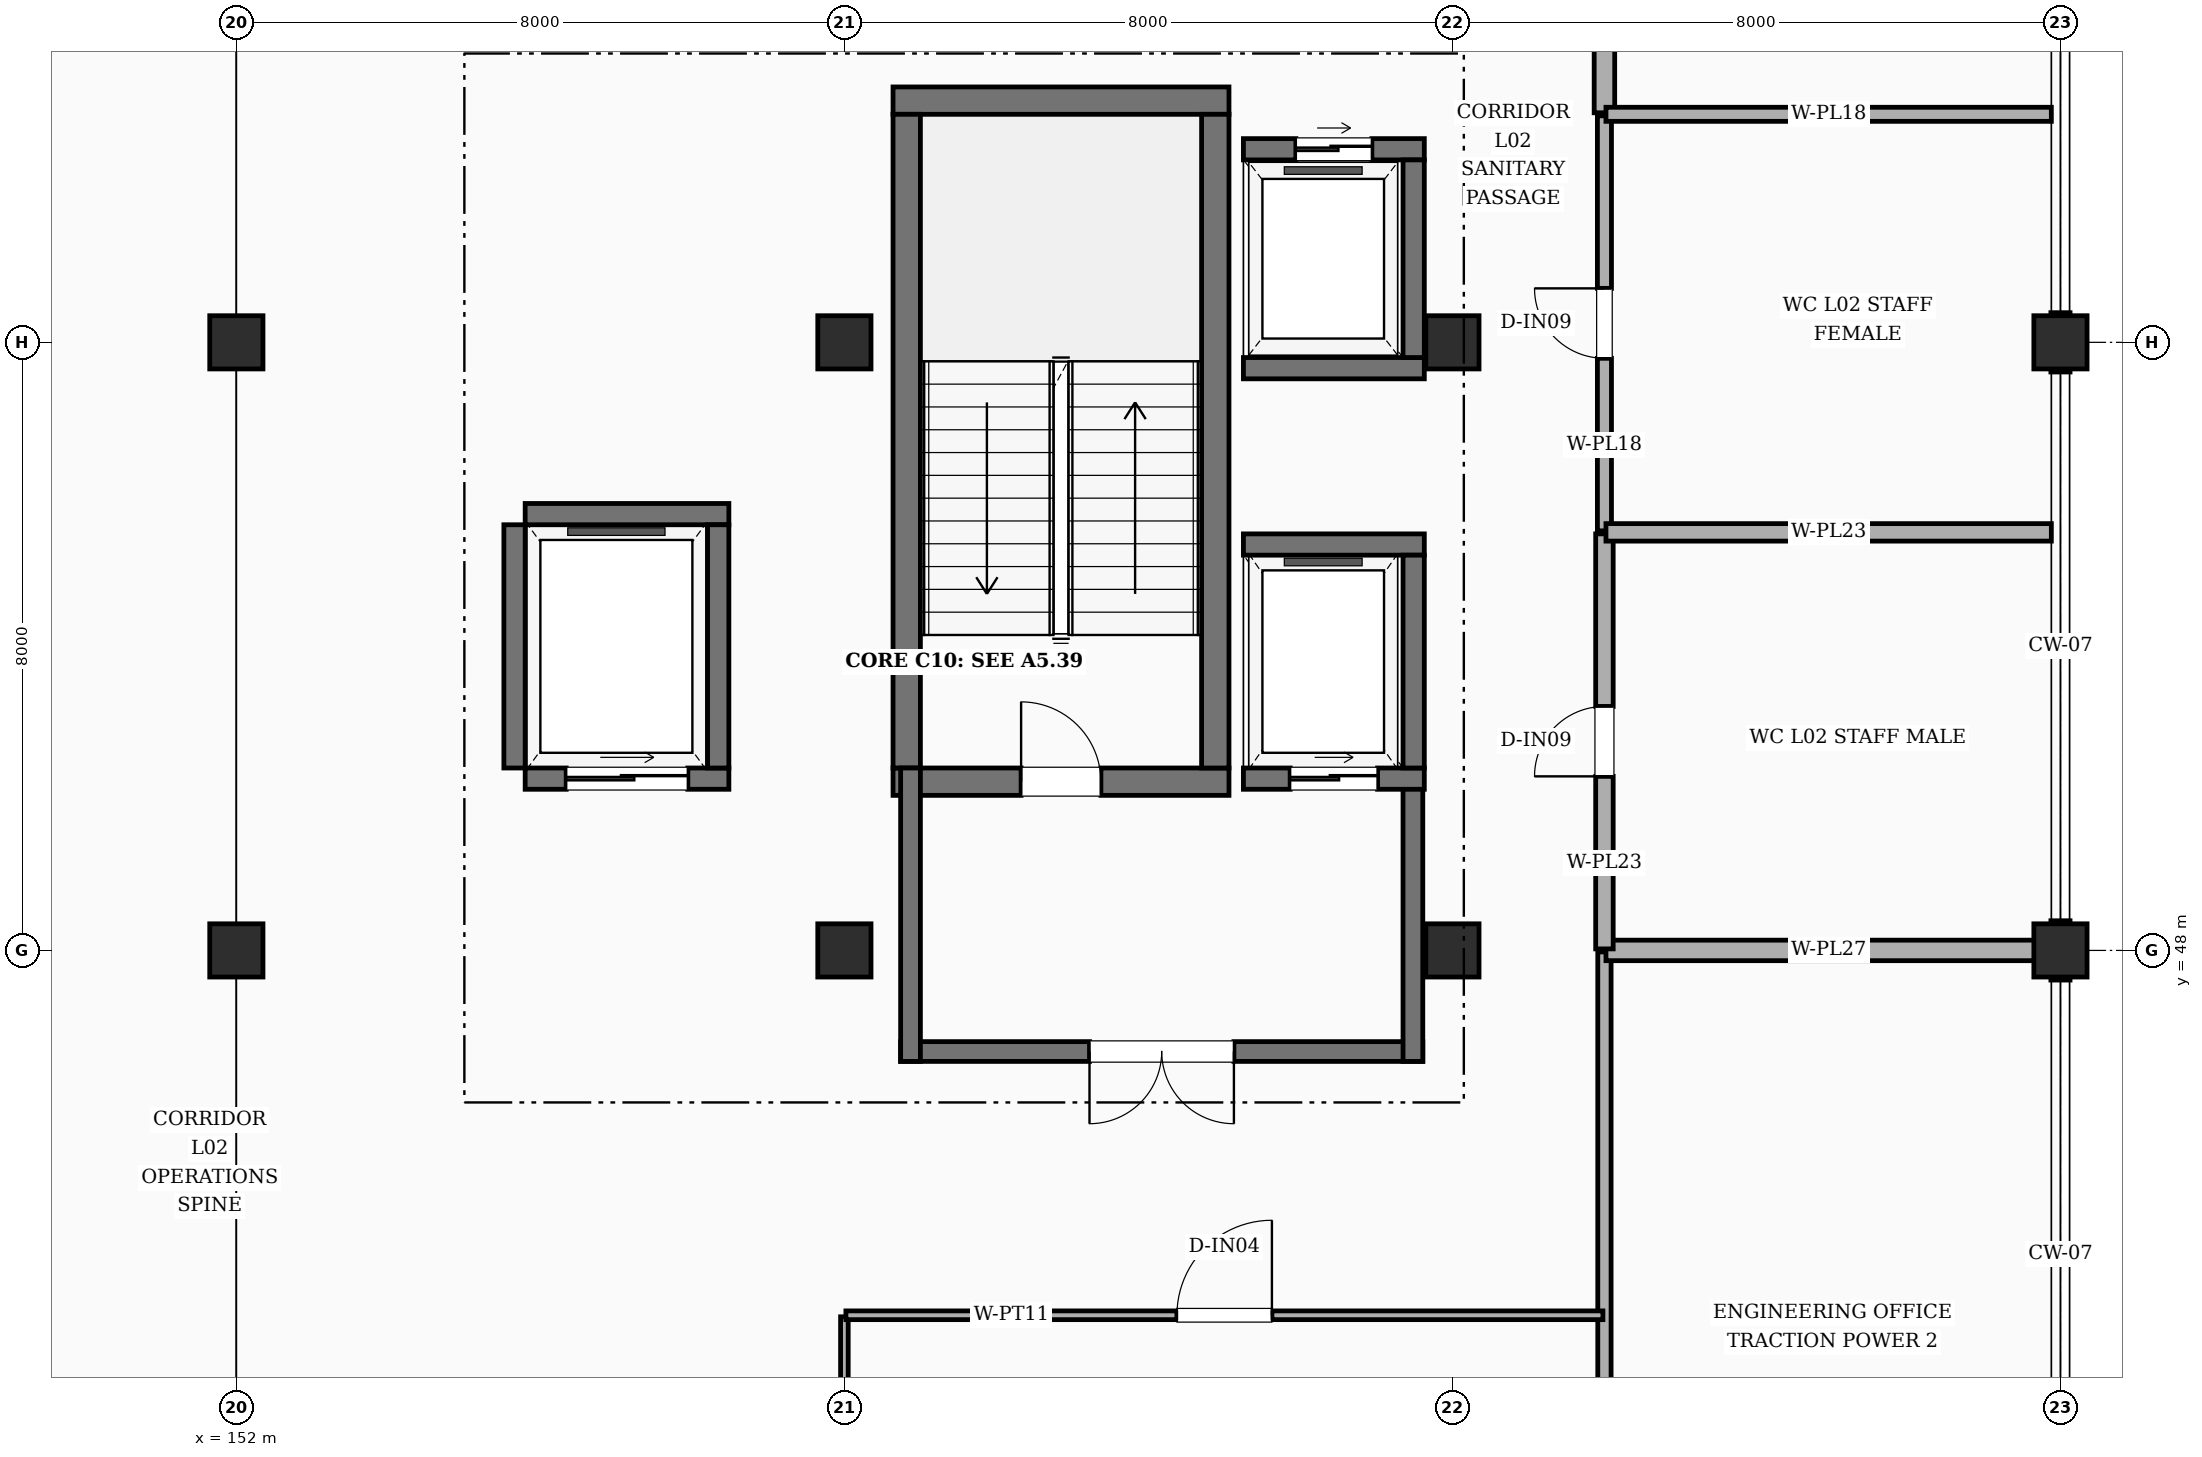
"""IFC4 building model, lengths in metres.
Left out: names, types, materials, properties, quantities, classifications, styles, units other than length and angle.
Written with IfcOpenShell. Run it as: python <this file> out.ifc"""

import sys

from ifc_helpers import new_model, si_unit, direction, frame, frame_2d, origin, origin_2d, place, context, subcontext, project, spatial, rectangle, extrude, element, fill, save


model = new_model("IFC4")
c1 = context("Model", 3, precision=1e-05, world=origin(), true_north=direction((0.0, 1.0)))
c2 = subcontext(c1, "Body", "Model", "MODEL_VIEW")
j1 = project(units=[si_unit("LENGTHUNIT", "METRE"), si_unit("PLANEANGLEUNIT", "RADIAN")], contexts=[c1])
p1 = place(None, origin())
s1 = spatial("IfcSite", under=j1, at=p1, CompositionType="ELEMENT")
p2 = place(p1, origin())
s2 = spatial("IfcBuilding", under=s1, at=p2, CompositionType="ELEMENT")
p3 = place(p2, frame((0.0, 0.0, 10.8)))
s3 = spatial("IfcBuildingStorey", under=s2, at=p3, CompositionType="ELEMENT", Elevation=10.8)
for number, where, z_axis, x_axis in (
    (1, (152.0, 48.0, 0.0), (0.0, 0.0, 1.0), (1.0, 0.0, 0.0)),
    (2, (152.0, 56.0, 0.0), (0.0, 0.0, 1.0), (1.0, 0.0, 0.0)),
    (3, (160.0, 48.0, 0.0), (0.0, 0.0, 1.0), (1.0, 0.0, 0.0)),
    (4, (160.0, 56.0, 0.0), (0.0, 0.0, 1.0), (1.0, 0.0, 0.0)),
    (5, (168.0, 48.0, 0.0), (0.0, 0.0, 1.0), (1.0, 0.0, 0.0)),
    (6, (168.0, 56.0, 0.0), (0.0, 0.0, 1.0), (1.0, 0.0, 0.0)),
    (7, (176.0, 48.0, 0.0), (0.0, 0.0, 1.0), (1.0, 0.0, 0.0)),
    (8, (176.0, 56.0, 0.0), (0.0, 0.0, 1.0), (1.0, 0.0, 0.0)),
):
    element("IfcColumn", number, at=place(p3, frame(where, z_axis=z_axis, x_axis=x_axis)), inside=s3, PredefinedType="COLUMN", context=c2, shape_type="SweptSolid", body=[
        extrude(rectangle(XDim=0.7, YDim=0.7, at=origin_2d()), origin(), (0.0, 0.0, 1.0), 4.2),
    ])
p4 = place(p3, frame((160.64, 50.22, 0.0), z_axis=(0.0, 0.0, 1.0), x_axis=(1.0, 0.0, 0.0)))
e9 = element("IfcWall", 9, at=p4, inside=s3, PredefinedType="SHEAR", context=c2, shape_type="SweptSolid", body=[
    extrude(rectangle(XDim=4.42, YDim=0.36, at=frame_2d((2.21, 0.0))), origin(), (0.0, 0.0, 1.0), 4.2),
])
p5 = place(p4, frame((1.685, 0.0, 0.0)))
e10 = element("IfcOpeningElement", 10, at=p5, cuts=e9, PredefinedType="OPENING", context=c2, shape_type="SweptSolid", body=[
    extrude(rectangle(XDim=1.05, YDim=2.15, at=frame_2d((0.525, 1.075))), frame((0.0, 0.19, 0.0), z_axis=(0.0, -1.0, 0.0), x_axis=(1.0, 0.0, 0.0)), (0.0, 0.0, 1.0), 0.38),
])
p6 = place(p3, frame((160.64, 59.18, 0.0), z_axis=(0.0, 0.0, 1.0), x_axis=(1.0, 0.0, 0.0)))
e11 = element("IfcWall", 11, at=p6, inside=s3, PredefinedType="SHEAR", context=c2, shape_type="SweptSolid", body=[
    extrude(rectangle(XDim=4.42, YDim=0.36, at=frame_2d((2.21, 0.0))), origin(), (0.0, 0.0, 1.0), 4.2),
])
for number, where, z_axis, x_axis in (
    (12, (160.82, 50.4, 0.0), (0.0, 0.0, 1.0), (0.0, 1.0, 0.0)),
    (13, (164.88, 50.4, 0.0), (0.0, 0.0, 1.0), (0.0, 1.0, 0.0)),
):
    element("IfcWall", number, at=place(p3, frame(where, z_axis=z_axis, x_axis=x_axis)), inside=s3, PredefinedType="SHEAR", context=c2, shape_type="SweptSolid", body=[
        extrude(rectangle(XDim=8.6, YDim=0.36, at=frame_2d((4.3, 0.0))), origin(), (0.0, 0.0, 1.0), 4.2),
    ])
p7 = place(p3, frame((167.61, 46.67, 0.0), z_axis=(0.0, 0.0, 1.0), x_axis=(-1.0, 0.0, 0.0)))
e14 = element("IfcWall", 14, at=p7, inside=s3, PredefinedType="SHEAR", context=c2, shape_type="SweptSolid", body=[
    extrude(rectangle(XDim=6.87, YDim=0.26, at=frame_2d((3.435, 0.0))), origin(), (0.0, 0.0, 1.0), 4.2),
])
p8 = place(p7, frame((2.485, 0.0, 0.0)))
e15 = element("IfcOpeningElement", 15, at=p8, cuts=e14, PredefinedType="OPENING", context=c2, shape_type="SweptSolid", body=[
    extrude(rectangle(XDim=1.9, YDim=2.25, at=frame_2d((0.95, 1.125))), frame((0.0, 0.14, 0.0), z_axis=(0.0, -1.0, 0.0), x_axis=(1.0, 0.0, 0.0)), (0.0, 0.0, 1.0), 0.28),
])
for number, where, z_axis, x_axis in (
    (16, (160.87, 46.54, 0.0), (0.0, 0.0, 1.0), (0.0, 1.0, 0.0)),
    (17, (167.48, 46.54, 0.0), (0.0, 0.0, 1.0), (0.0, 1.0, 0.0)),
):
    element("IfcWall", number, at=place(p3, frame(where, z_axis=z_axis, x_axis=x_axis)), inside=s3, PredefinedType="SHEAR", context=c2, shape_type="SweptSolid", body=[
        extrude(rectangle(XDim=3.86, YDim=0.26, at=frame_2d((1.93, 0.0))), origin(), (0.0, 0.0, 1.0), 4.2),
    ])
p9 = place(p3, frame((165.25, 50.26, 0.0), z_axis=(0.0, 0.0, 1.0), x_axis=(1.0, 0.0, 0.0)))
e18 = element("IfcWall", 18, at=p9, inside=s3, PredefinedType="SHEAR", context=c2, shape_type="SweptSolid", body=[
    extrude(rectangle(XDim=2.38, YDim=0.28, at=frame_2d((1.19, 0.0))), origin(), (0.0, 0.0, 1.0), 4.2),
])
p10 = place(p9, frame((0.615, 0.0, 0.0)))
e19 = element("IfcOpeningElement", 19, at=p10, cuts=e18, PredefinedType="OPENING", context=c2, shape_type="SweptSolid", body=[
    extrude(rectangle(XDim=1.15, YDim=2.2, at=frame_2d((0.575, 1.1))), frame((0.0, 0.15, 0.0), z_axis=(0.0, -1.0, 0.0), x_axis=(1.0, 0.0, 0.0)), (0.0, 0.0, 1.0), 0.3),
])
p11 = place(p3, frame((165.25, 53.34, 0.0), z_axis=(0.0, 0.0, 1.0), x_axis=(1.0, 0.0, 0.0)))
e20 = element("IfcWall", 20, at=p11, inside=s3, PredefinedType="SHEAR", context=c2, shape_type="SweptSolid", body=[
    extrude(rectangle(XDim=2.38, YDim=0.28, at=frame_2d((1.19, 0.0))), origin(), (0.0, 0.0, 1.0), 4.2),
])
p12 = place(p3, frame((167.49, 50.4, 0.0), z_axis=(0.0, 0.0, 1.0), x_axis=(0.0, 1.0, 0.0)))
e21 = element("IfcWall", 21, at=p12, inside=s3, PredefinedType="SHEAR", context=c2, shape_type="SweptSolid", body=[
    extrude(rectangle(XDim=2.8, YDim=0.28, at=frame_2d((1.4, 0.0))), origin(), (0.0, 0.0, 1.0), 4.2),
])
p13 = place(p3, frame((165.25, 55.66, 0.0), z_axis=(0.0, 0.0, 1.0), x_axis=(1.0, 0.0, 0.0)))
e22 = element("IfcWall", 22, at=p13, inside=s3, PredefinedType="SHEAR", context=c2, shape_type="SweptSolid", body=[
    extrude(rectangle(XDim=2.38, YDim=0.28, at=frame_2d((1.19, 0.0))), origin(), (0.0, 0.0, 1.0), 4.2),
])
p14 = place(p3, frame((165.25, 58.54, 0.0), z_axis=(0.0, 0.0, 1.0), x_axis=(1.0, 0.0, 0.0)))
e23 = element("IfcWall", 23, at=p14, inside=s3, PredefinedType="SHEAR", context=c2, shape_type="SweptSolid", body=[
    extrude(rectangle(XDim=2.38, YDim=0.28, at=frame_2d((1.19, 0.0))), origin(), (0.0, 0.0, 1.0), 4.2),
])
p15 = place(p14, frame((0.69, 0.0, 0.0)))
e24 = element("IfcOpeningElement", 24, at=p15, cuts=e23, PredefinedType="OPENING", context=c2, shape_type="SweptSolid", body=[
    extrude(rectangle(XDim=1.0, YDim=2.15, at=frame_2d((0.5, 1.075))), frame((0.0, 0.15, 0.0), z_axis=(0.0, -1.0, 0.0), x_axis=(1.0, 0.0, 0.0)), (0.0, 0.0, 1.0), 0.3),
])
p16 = place(p3, frame((167.49, 55.8, 0.0), z_axis=(0.0, 0.0, 1.0), x_axis=(0.0, 1.0, 0.0)))
e25 = element("IfcWall", 25, at=p16, inside=s3, PredefinedType="SHEAR", context=c2, shape_type="SweptSolid", body=[
    extrude(rectangle(XDim=2.6, YDim=0.28, at=frame_2d((1.3, 0.0))), origin(), (0.0, 0.0, 1.0), 4.2),
])
p17 = place(p3, frame((155.8, 50.26, 0.0), z_axis=(0.0, 0.0, 1.0), x_axis=(1.0, 0.0, 0.0)))
e26 = element("IfcWall", 26, at=p17, inside=s3, PredefinedType="SHEAR", context=c2, shape_type="SweptSolid", body=[
    extrude(rectangle(XDim=2.68, YDim=0.28, at=frame_2d((1.34, 0.0))), origin(), (0.0, 0.0, 1.0), 4.2),
])
p18 = place(p17, frame((0.54, 0.0, 0.0)))
e27 = element("IfcOpeningElement", 27, at=p18, cuts=e26, PredefinedType="OPENING", context=c2, shape_type="SweptSolid", body=[
    extrude(rectangle(XDim=1.6, YDim=2.35, at=frame_2d((0.8, 1.175))), frame((0.0, 0.15, 0.0), z_axis=(0.0, -1.0, 0.0), x_axis=(1.0, 0.0, 0.0)), (0.0, 0.0, 1.0), 0.3),
])
p19 = place(p3, frame((155.8, 53.74, 0.0), z_axis=(0.0, 0.0, 1.0), x_axis=(1.0, 0.0, 0.0)))
e28 = element("IfcWall", 28, at=p19, inside=s3, PredefinedType="SHEAR", context=c2, shape_type="SweptSolid", body=[
    extrude(rectangle(XDim=2.68, YDim=0.28, at=frame_2d((1.34, 0.0))), origin(), (0.0, 0.0, 1.0), 4.2),
])
for number, where, z_axis, x_axis in (
    (29, (158.34, 50.4, 0.0), (0.0, 0.0, 1.0), (0.0, 1.0, 0.0)),
    (30, (155.66, 50.4, 0.0), (0.0, 0.0, 1.0), (0.0, 1.0, 0.0)),
):
    element("IfcWall", number, at=place(p3, frame(where, z_axis=z_axis, x_axis=x_axis)), inside=s3, PredefinedType="SHEAR", context=c2, shape_type="SweptSolid", body=[
        extrude(rectangle(XDim=3.2, YDim=0.28, at=frame_2d((1.6, 0.0))), origin(), (0.0, 0.0, 1.0), 4.2),
    ])
p20 = place(p3, frame((160.0, 24.02, 0.0), z_axis=(0.0, 0.0, 1.0), x_axis=(0.0, 1.0, 0.0)))
e31 = element("IfcWall", 31, at=p20, inside=s3, PredefinedType="PARTITIONING", context=c2, shape_type="SweptSolid", body=[
    extrude(rectangle(XDim=19.16, YDim=0.1, at=frame_2d((9.58, 0.0))), origin(), (0.0, 0.0, 1.0), 3.25),
])
p21 = place(p3, frame((170.0, 24.02, 0.0), z_axis=(0.0, 0.0, 1.0), x_axis=(0.0, 1.0, 0.0)))
e32 = element("IfcWall", 32, at=p21, inside=s3, PredefinedType="PARTITIONING", context=c2, shape_type="SweptSolid", body=[
    extrude(rectangle(XDim=23.96, YDim=0.175, at=frame_2d((11.98, 0.0))), origin(), (0.0, 0.0, 1.0), 3.25),
])
p22 = place(p21, frame((11.47, 0.0, 0.0)))
e33 = element("IfcOpeningElement", 33, at=p22, cuts=e32, PredefinedType="OPENING", context=c2, shape_type="SweptSolid", body=[
    extrude(rectangle(XDim=1.02, YDim=2.12, at=frame_2d((0.51, 1.06))), frame((0.0, 0.097, 0.0), z_axis=(0.0, -1.0, 0.0), x_axis=(1.0, 0.0, 0.0)), (0.0, 0.0, 1.0), 0.195),
])
p23 = place(p3, frame((170.02, 48.0, 0.0), z_axis=(0.0, 0.0, 1.0), x_axis=(1.0, 0.0, 0.0)))
e34 = element("IfcWall", 34, at=p23, inside=s3, PredefinedType="PLUMBINGWALL", context=c2, shape_type="SweptSolid", body=[
    extrude(rectangle(XDim=5.86, YDim=0.27, at=frame_2d((2.93, 0.0))), origin(), (0.0, 0.0, 1.0), 3.25),
])
p24 = place(p3, frame((170.0, 48.02, 0.0), z_axis=(0.0, 0.0, 1.0), x_axis=(0.0, 1.0, 0.0)))
e35 = element("IfcWall", 35, at=p24, inside=s3, PredefinedType="PLUMBINGWALL", context=c2, shape_type="SweptSolid", body=[
    extrude(rectangle(XDim=5.46, YDim=0.23, at=frame_2d((2.73, 0.0))), origin(), (0.0, 0.0, 1.0), 3.25),
])
p25 = place(p24, frame((2.27, 0.0, 0.0)))
e36 = element("IfcOpeningElement", 36, at=p25, cuts=e35, PredefinedType="OPENING", context=c2, shape_type="SweptSolid", body=[
    extrude(rectangle(XDim=0.92, YDim=2.1, at=frame_2d((0.46, 1.05))), frame((0.0, 0.125, 0.0), z_axis=(0.0, -1.0, 0.0), x_axis=(1.0, 0.0, 0.0)), (0.0, 0.0, 1.0), 0.25),
])
p26 = place(p3, frame((170.0, 53.52, 0.0), z_axis=(0.0, 0.0, 1.0), x_axis=(0.0, 1.0, 0.0)))
e37 = element("IfcWall", 37, at=p26, inside=s3, PredefinedType="PLUMBINGWALL", context=c2, shape_type="SweptSolid", body=[
    extrude(rectangle(XDim=5.46, YDim=0.185, at=frame_2d((2.73, 0.0))), origin(), (0.0, 0.0, 1.0), 3.25),
])
p27 = place(p26, frame((2.27, 0.0, 0.0)))
e38 = element("IfcOpeningElement", 38, at=p27, cuts=e37, PredefinedType="OPENING", context=c2, shape_type="SweptSolid", body=[
    extrude(rectangle(XDim=0.92, YDim=2.1, at=frame_2d((0.46, 1.05))), frame((0.0, 0.103, 0.0), z_axis=(0.0, -1.0, 0.0), x_axis=(1.0, 0.0, 0.0)), (0.0, 0.0, 1.0), 0.205),
])
p28 = place(p3, frame((170.0, 59.02, 0.0), z_axis=(0.0, 0.0, 1.0), x_axis=(0.0, 1.0, 0.0)))
e39 = element("IfcWall", 39, at=p28, inside=s3, PredefinedType="PLUMBINGWALL", context=c2, shape_type="SweptSolid", body=[
    extrude(rectangle(XDim=4.86, YDim=0.27, at=frame_2d((2.43, 0.0))), origin(), (0.0, 0.0, 1.0), 3.25),
])
p29 = place(p28, frame((1.95, 0.0, 0.0)))
e40 = element("IfcOpeningElement", 40, at=p29, cuts=e39, PredefinedType="OPENING", context=c2, shape_type="SweptSolid", body=[
    extrude(rectangle(XDim=0.96, YDim=2.1, at=frame_2d((0.48, 1.05))), frame((0.0, 0.145, 0.0), z_axis=(0.0, -1.0, 0.0), x_axis=(1.0, 0.0, 0.0)), (0.0, 0.0, 1.0), 0.29),
])
p30 = place(p3, frame((170.02, 53.5, 0.0), z_axis=(0.0, 0.0, 1.0), x_axis=(1.0, 0.0, 0.0)))
e41 = element("IfcWall", 41, at=p30, inside=s3, PredefinedType="PLUMBINGWALL", context=c2, shape_type="SweptSolid", body=[
    extrude(rectangle(XDim=5.86, YDim=0.23, at=frame_2d((2.93, 0.0))), origin(), (0.0, 0.0, 1.0), 3.33),
])
p31 = place(p3, frame((170.02, 59.0, 0.0), z_axis=(0.0, 0.0, 1.0), x_axis=(1.0, 0.0, 0.0)))
e42 = element("IfcWall", 42, at=p31, inside=s3, PredefinedType="PLUMBINGWALL", context=c2, shape_type="SweptSolid", body=[
    extrude(rectangle(XDim=5.86, YDim=0.185, at=frame_2d((2.93, 0.0))), origin(), (0.0, 0.0, 1.0), 3.33),
])
p32 = place(p3, frame((160.02, 43.2, 0.0), z_axis=(0.0, 0.0, 1.0), x_axis=(1.0, 0.0, 0.0)))
e43 = element("IfcWall", 43, at=p32, inside=s3, PredefinedType="PARTITIONING", context=c2, shape_type="SweptSolid", body=[
    extrude(rectangle(XDim=9.96, YDim=0.115, at=frame_2d((4.98, 0.0))), origin(), (0.0, 0.0, 1.0), 3.25),
])
p33 = place(p32, frame((4.355, 0.0, 0.0)))
e44 = element("IfcOpeningElement", 44, at=p33, cuts=e43, PredefinedType="OPENING", context=c2, shape_type="SweptSolid", body=[
    extrude(rectangle(XDim=1.25, YDim=2.15, at=frame_2d((0.625, 1.075))), frame((0.0, 0.067, 0.0), z_axis=(0.0, -1.0, 0.0), x_axis=(1.0, 0.0, 0.0)), (0.0, 0.0, 1.0), 0.135),
])
p34 = place(p5, origin())
e45 = element("IfcDoor", 45, at=p34, inside=s3, OperationType="SINGLE_SWING_LEFT", PredefinedType="DOOR", context=c2, shape_type="SweptSolid", body=[
    extrude(rectangle(XDim=1.05, YDim=2.15, at=frame_2d((0.525, 1.075))), frame((0.0, 0.025, 0.0), z_axis=(0.0, -1.0, 0.0), x_axis=(1.0, 0.0, 0.0)), (0.0, 0.0, 1.0), 0.05),
])
fill(e10, e45)
p35 = place(p8, origin())
e46 = element("IfcDoor", 46, at=p35, inside=s3, OperationType="DOUBLE_DOOR_SINGLE_SWING", PredefinedType="DOOR", context=c2, shape_type="SweptSolid", body=[
    extrude(rectangle(XDim=1.9, YDim=2.25, at=frame_2d((0.95, 1.125))), frame((0.0, 0.025, 0.0), z_axis=(0.0, -1.0, 0.0), x_axis=(1.0, 0.0, 0.0)), (0.0, 0.0, 1.0), 0.05),
])
fill(e15, e46)
p36 = place(p10, origin())
e47 = element("IfcDoor", 47, at=p36, inside=s3, OperationType="SLIDING_TO_LEFT", PredefinedType="DOOR", context=c2, shape_type="SweptSolid", body=[
    extrude(rectangle(XDim=1.15, YDim=2.2, at=frame_2d((0.575, 1.1))), frame((0.0, 0.025, 0.0), z_axis=(0.0, -1.0, 0.0), x_axis=(1.0, 0.0, 0.0)), (0.0, 0.0, 1.0), 0.05),
])
fill(e19, e47)
p37 = place(p15, origin())
e48 = element("IfcDoor", 48, at=p37, inside=s3, OperationType="SLIDING_TO_LEFT", PredefinedType="DOOR", context=c2, shape_type="SweptSolid", body=[
    extrude(rectangle(XDim=1.0, YDim=2.15, at=frame_2d((0.5, 1.075))), frame((0.0, 0.025, 0.0), z_axis=(0.0, -1.0, 0.0), x_axis=(1.0, 0.0, 0.0)), (0.0, 0.0, 1.0), 0.05),
])
fill(e24, e48)
p38 = place(p18, origin())
e49 = element("IfcDoor", 49, at=p38, inside=s3, OperationType="SLIDING_TO_LEFT", PredefinedType="DOOR", context=c2, shape_type="SweptSolid", body=[
    extrude(rectangle(XDim=1.6, YDim=2.35, at=frame_2d((0.8, 1.175))), frame((0.0, 0.025, 0.0), z_axis=(0.0, -1.0, 0.0), x_axis=(1.0, 0.0, 0.0)), (0.0, 0.0, 1.0), 0.05),
])
fill(e27, e49)
p39 = place(p25, origin())
e50 = element("IfcDoor", 50, at=p39, inside=s3, OperationType="SINGLE_SWING_LEFT", PredefinedType="DOOR", context=c2, shape_type="SweptSolid", body=[
    extrude(rectangle(XDim=0.92, YDim=2.1, at=frame_2d((0.46, 1.05))), frame((0.0, 0.025, 0.0), z_axis=(0.0, -1.0, 0.0), x_axis=(1.0, 0.0, 0.0)), (0.0, 0.0, 1.0), 0.05),
])
fill(e36, e50)
p40 = place(p27, origin())
e51 = element("IfcDoor", 51, at=p40, inside=s3, OperationType="SINGLE_SWING_RIGHT", PredefinedType="DOOR", context=c2, shape_type="SweptSolid", body=[
    extrude(rectangle(XDim=0.92, YDim=2.1, at=frame_2d((0.46, 1.05))), frame((0.0, 0.025, 0.0), z_axis=(0.0, -1.0, 0.0), x_axis=(1.0, 0.0, 0.0)), (0.0, 0.0, 1.0), 0.05),
])
fill(e38, e51)
p41 = place(p33, origin())
e52 = element("IfcDoor", 52, at=p41, inside=s3, OperationType="SINGLE_SWING_RIGHT", PredefinedType="DOOR", context=c2, shape_type="SweptSolid", body=[
    extrude(rectangle(XDim=1.25, YDim=2.15, at=frame_2d((0.625, 1.075))), frame((0.0, 0.025, 0.0), z_axis=(0.0, -1.0, 0.0), x_axis=(1.0, 0.0, 0.0)), (0.0, 0.0, 1.0), 0.05),
])
fill(e44, e52)
save(model, sys.argv[1])
